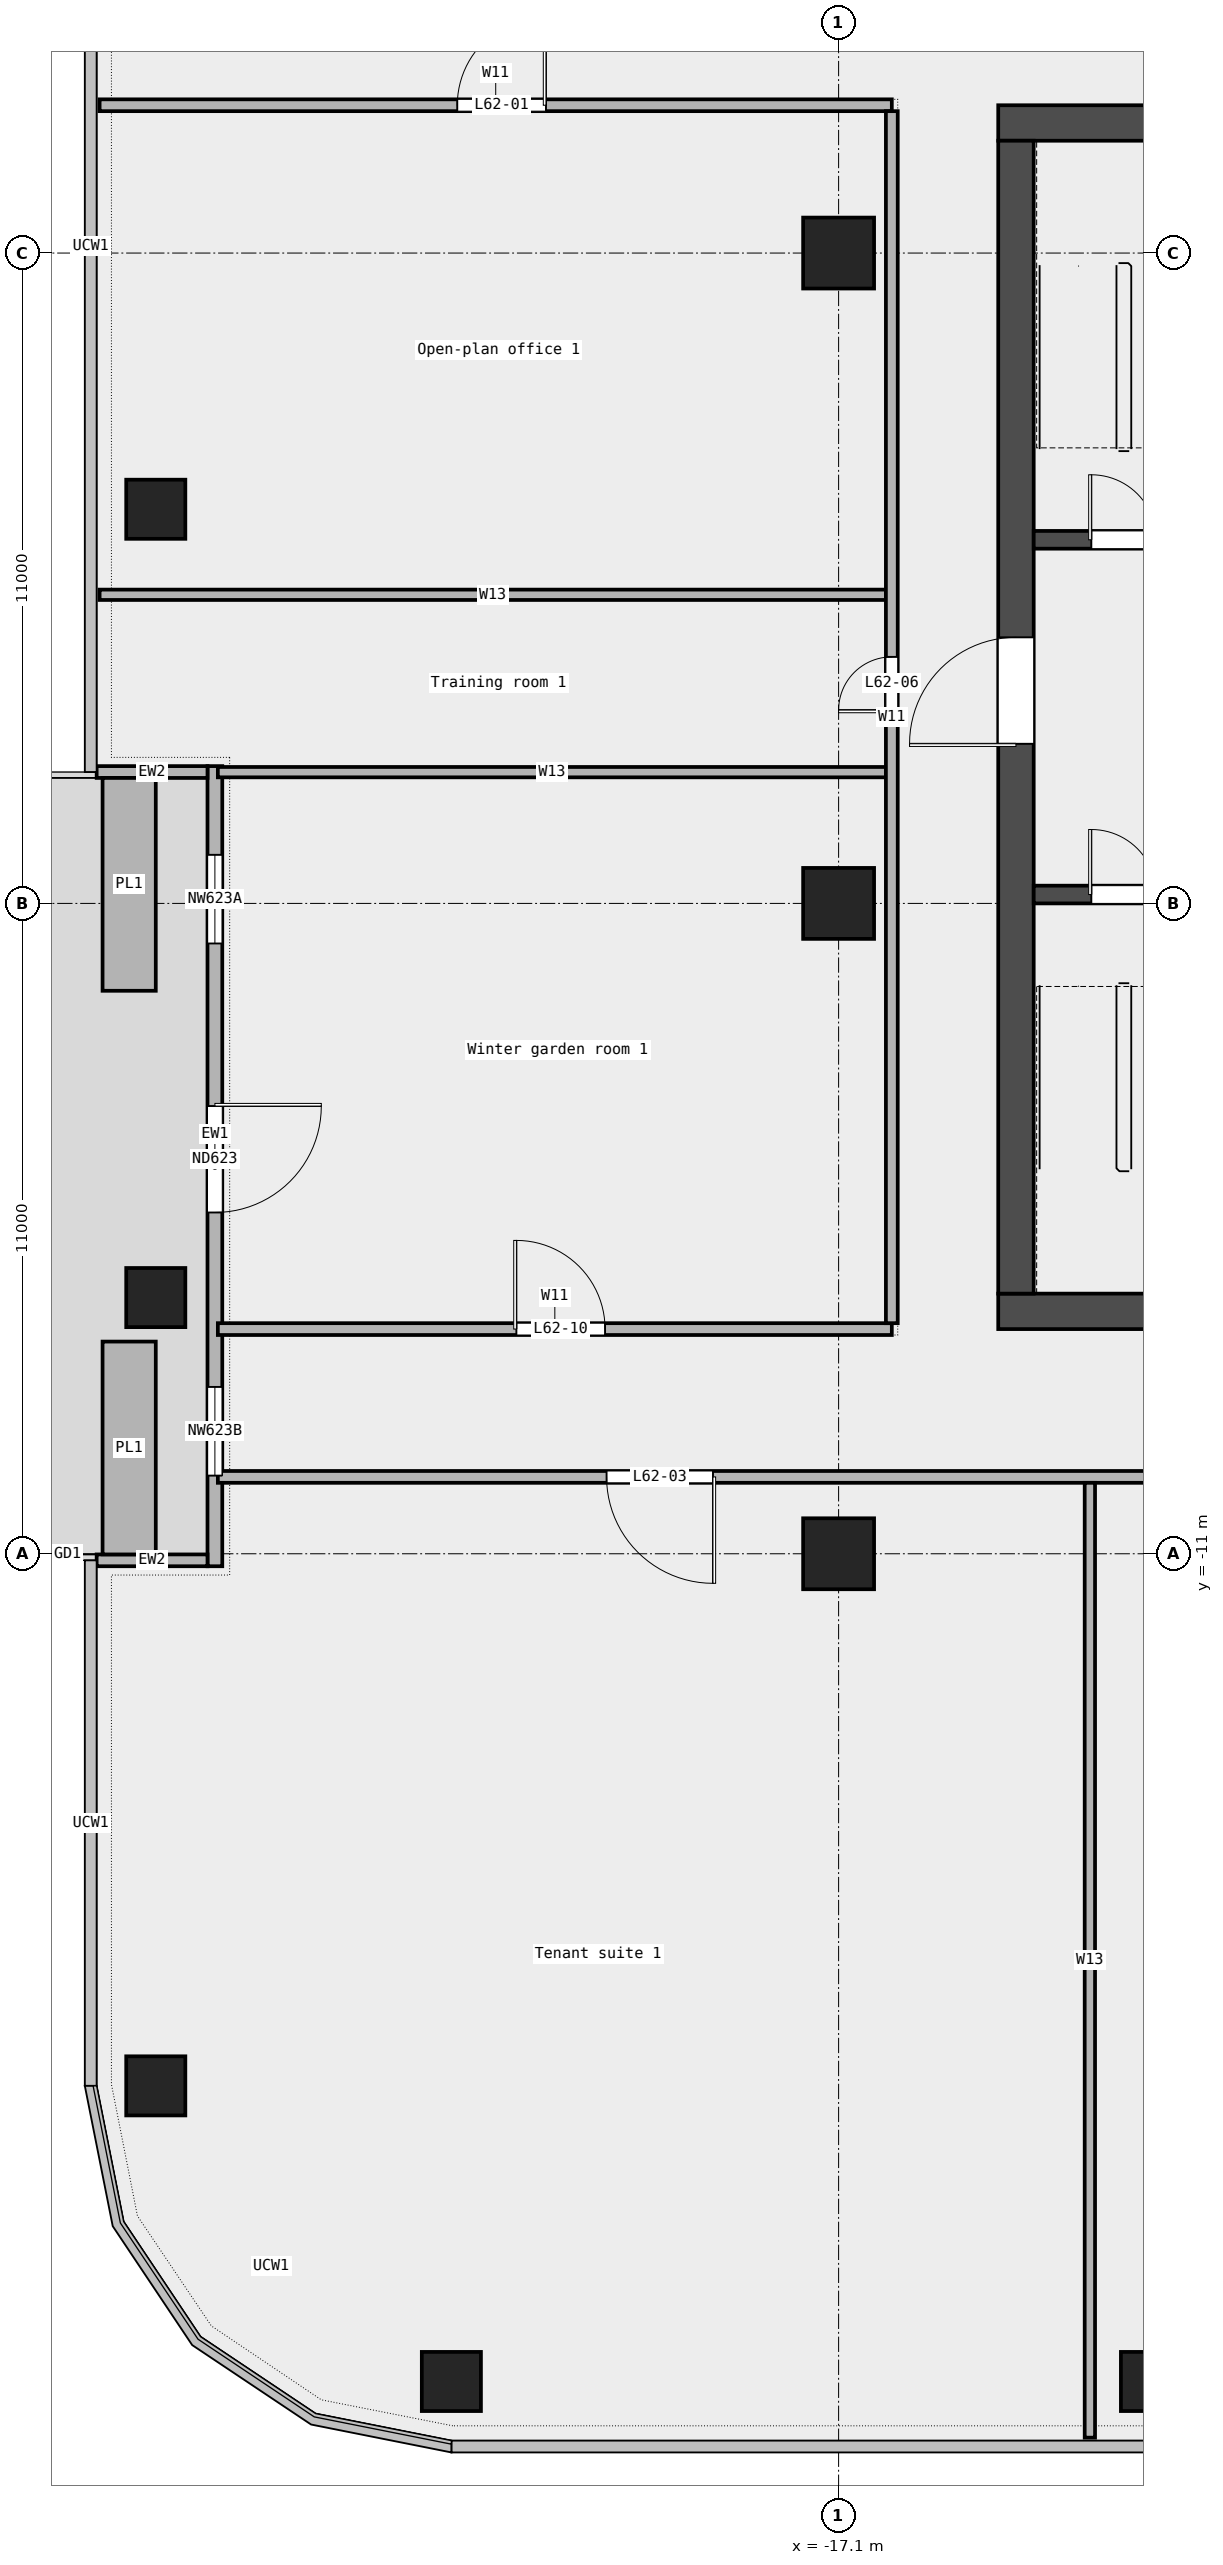
"""IFC4 building model, lengths in metres.
Left out: names, types, materials, properties, quantities, classifications, styles, units other than length and angle.
Written with IfcOpenShell. Run it as: python <this file> out.ifc"""

import sys

from ifc_helpers import new_model, si_unit, direction, frame, frame_2d, origin, origin_2d, place, context, subcontext, project, spatial, rectangle, extrude, element, fill, save


model = new_model("IFC4")
c1 = context("Model", 3, precision=1e-05, world=origin(), true_north=direction((0.0, 1.0)))
c2 = subcontext(c1, "Body", "Model", "MODEL_VIEW")
j1 = project(units=[si_unit("LENGTHUNIT", "METRE"), si_unit("PLANEANGLEUNIT", "RADIAN")], contexts=[c1])
p1 = place(None, origin())
s1 = spatial("IfcSite", under=j1, at=p1, CompositionType="ELEMENT")
p2 = place(p1, origin())
s2 = spatial("IfcBuilding", under=s1, at=p2, CompositionType="ELEMENT")
p3 = place(p2, frame((0.0, 0.0, 287.4)))
s3 = spatial("IfcBuildingStorey", under=s2, at=p3, CompositionType="ELEMENT", Elevation=287.4)
for number, where, z_axis, x_axis in (
    (1, (-23.65, -25.0, 0.0), (0.0, 0.0, 1.0), (1.0, 0.0, 0.0)),
    (2, (-11.825, -25.0, 0.0), (0.0, 0.0, 1.0), (1.0, 0.0, 0.0)),
    (3, (-28.65, 6.667, 0.0), (0.0, 0.0, 1.0), (1.0, 0.0, 0.0)),
    (4, (-28.65, -6.667, 0.0), (0.0, 0.0, 1.0), (1.0, 0.0, 0.0)),
    (5, (-28.65, -20.0, 0.0), (0.0, 0.0, 1.0), (1.0, 0.0, 0.0)),
):
    element("IfcColumn", number, at=place(p3, frame(where, z_axis=z_axis, x_axis=x_axis)), inside=s3, PredefinedType="COLUMN", context=c2, shape_type="SweptSolid", body=[
        extrude(rectangle(XDim=1.0, YDim=1.0, at=origin_2d()), origin(), (0.0, 0.0, 1.0), 3.6),
    ])
for number, where, z_axis, x_axis in (
    (6, (-17.1, -11.0, 0.0), (0.0, 0.0, 1.0), (1.0, 0.0, 0.0)),
    (7, (-17.1, 0.0, 0.0), (0.0, 0.0, 1.0), (1.0, 0.0, 0.0)),
    (8, (-17.1, 11.0, 0.0), (0.0, 0.0, 1.0), (1.0, 0.0, 0.0)),
):
    element("IfcColumn", number, at=place(p3, frame(where, z_axis=z_axis, x_axis=x_axis)), inside=s3, PredefinedType="COLUMN", context=c2, shape_type="SweptSolid", body=[
        extrude(rectangle(XDim=1.2, YDim=1.2, at=origin_2d()), origin(), (0.0, 0.0, 1.0), 3.6),
    ])
p4 = place(p3, frame((-27.65, 2.322, 0.0), z_axis=(0.0, 0.0, 1.0), x_axis=(0.0, -1.0, 0.0)))
e9 = element("IfcWall", 9, at=p4, inside=s3, PredefinedType="STANDARD", context=c2, shape_type="SweptSolid", body=[
    extrude(rectangle(XDim=13.533, YDim=0.25, at=frame_2d((6.767, 0.0))), origin(), (0.0, 0.0, 1.0), 3.6),
])
p5 = place(p4, frame((1.5, 0.0, 0.45)))
e10 = element("IfcOpeningElement", 10, at=p5, cuts=e9, PredefinedType="OPENING", context=c2, shape_type="SweptSolid", body=[
    extrude(rectangle(XDim=1.5, YDim=2.4, at=frame_2d((0.75, 1.2))), frame((0.0, 0.137, 0.0), z_axis=(0.0, -1.0, 0.0), x_axis=(1.0, 0.0, 0.0)), (0.0, 0.0, 1.0), 0.274),
])
p6 = place(p4, frame((5.75, 0.0, 0.0)))
e11 = element("IfcOpeningElement", 11, at=p6, cuts=e9, PredefinedType="OPENING", context=c2, shape_type="SweptSolid", body=[
    extrude(rectangle(XDim=1.8, YDim=2.4, at=frame_2d((0.9, 1.2))), frame((0.0, 0.137, 0.0), z_axis=(0.0, -1.0, 0.0), x_axis=(1.0, 0.0, 0.0)), (0.0, 0.0, 1.0), 0.274),
])
p7 = place(p4, frame((10.5, 0.0, 0.45)))
e12 = element("IfcOpeningElement", 12, at=p7, cuts=e9, PredefinedType="OPENING", context=c2, shape_type="SweptSolid", body=[
    extrude(rectangle(XDim=1.5, YDim=2.4, at=frame_2d((0.75, 1.2))), frame((0.0, 0.137, 0.0), z_axis=(0.0, -1.0, 0.0), x_axis=(1.0, 0.0, 0.0)), (0.0, 0.0, 1.0), 0.274),
])
for number, where, z_axis, x_axis in (
    (13, (-29.65, 2.222, 0.0), (0.0, 0.0, 1.0), (1.0, 0.0, 0.0)),
    (14, (-29.65, -11.111, 0.0), (0.0, 0.0, 1.0), (1.0, 0.0, 0.0)),
):
    element("IfcWall", number, at=place(p3, frame(where, z_axis=z_axis, x_axis=x_axis)), inside=s3, PredefinedType="STANDARD", context=c2, shape_type="SweptSolid", body=[
        extrude(rectangle(XDim=1.875, YDim=0.2, at=frame_2d((0.938, 0.0))), origin(), (0.0, 0.0, 1.0), 3.6),
    ])
for number, where, z_axis, x_axis in (
    (15, (-29.1, 2.122, 0.0), (0.0, 0.0, 1.0), (0.0, -1.0, 0.0)),
    (16, (-29.1, -7.411, 0.0), (0.0, 0.0, 1.0), (0.0, -1.0, 0.0)),
):
    element("IfcWall", number, at=place(p3, frame(where, z_axis=z_axis, x_axis=x_axis)), inside=s3, PredefinedType="STANDARD", context=c2, shape_type="SweptSolid", body=[
        extrude(rectangle(XDim=3.6, YDim=0.9, at=frame_2d((1.8, 0.0))), origin(), (0.0, 0.0, 1.0), 0.7),
    ])
p8 = place(p3, frame((-27.6, -9.7, 0.0), z_axis=(0.0, 0.0, 1.0), x_axis=(1.0, 0.0, 0.0)))
e17 = element("IfcWall", 17, at=p8, inside=s3, PredefinedType="PARTITIONING", context=c2, shape_type="SweptSolid", body=[
    extrude(rectangle(XDim=55.2, YDim=0.2, at=frame_2d((27.6, 0.0))), origin(), (0.0, 0.0, 1.0), 3.6),
])
p9 = place(p8, frame((6.575, 0.0, 0.0)))
e18 = element("IfcOpeningElement", 18, at=p9, cuts=e17, PredefinedType="OPENING", context=c2, shape_type="SweptSolid", body=[
    extrude(rectangle(XDim=1.8, YDim=2.1, at=frame_2d((0.9, 1.05))), frame((0.0, 0.112, 0.0), z_axis=(0.0, -1.0, 0.0), x_axis=(1.0, 0.0, 0.0)), (0.0, 0.0, 1.0), 0.224),
])
p10 = place(p8, frame((33.975, 0.0, 0.0)))
e19 = element("IfcOpeningElement", 19, at=p10, cuts=e17, PredefinedType="OPENING", context=c2, shape_type="SweptSolid", body=[
    extrude(rectangle(XDim=1.8, YDim=2.1, at=frame_2d((0.9, 1.05))), frame((0.0, 0.112, 0.0), z_axis=(0.0, -1.0, 0.0), x_axis=(1.0, 0.0, 0.0)), (0.0, 0.0, 1.0), 0.224),
])
p11 = place(p3, frame((-27.6, -7.2, 0.0), z_axis=(0.0, 0.0, 1.0), x_axis=(1.0, 0.0, 0.0)))
e20 = element("IfcWall", 20, at=p11, inside=s3, PredefinedType="PARTITIONING", context=c2, shape_type="SweptSolid", body=[
    extrude(rectangle(XDim=11.4, YDim=0.2, at=frame_2d((5.7, 0.0))), origin(), (0.0, 0.0, 1.0), 3.6),
])
p12 = place(p11, frame((5.05, 0.0, 0.0)))
e21 = element("IfcOpeningElement", 21, at=p12, cuts=e20, PredefinedType="OPENING", context=c2, shape_type="SweptSolid", body=[
    extrude(rectangle(XDim=1.5, YDim=2.1, at=frame_2d((0.75, 1.05))), frame((0.0, 0.112, 0.0), z_axis=(0.0, -1.0, 0.0), x_axis=(1.0, 0.0, 0.0)), (0.0, 0.0, 1.0), 0.224),
])
p13 = place(p3, frame((-27.6, 2.22, 0.0), z_axis=(0.0, 0.0, 1.0), x_axis=(1.0, 0.0, 0.0)))
e22 = element("IfcWall", 22, at=p13, inside=s3, PredefinedType="PARTITIONING", context=c2, shape_type="SweptSolid", body=[
    extrude(rectangle(XDim=11.3, YDim=0.175, at=frame_2d((5.65, 0.0))), origin(), (0.0, 0.0, 1.0), 3.6),
])
p14 = place(p3, frame((-29.6, 5.22, 0.0), z_axis=(0.0, 0.0, 1.0), x_axis=(1.0, 0.0, 0.0)))
e23 = element("IfcWall", 23, at=p14, inside=s3, PredefinedType="PARTITIONING", context=c2, shape_type="SweptSolid", body=[
    extrude(rectangle(XDim=13.3, YDim=0.175, at=frame_2d((6.65, 0.0))), origin(), (0.0, 0.0, 1.0), 3.6),
])
p15 = place(p3, frame((-29.6, 13.5, 0.0), z_axis=(0.0, 0.0, 1.0), x_axis=(1.0, 0.0, 0.0)))
e24 = element("IfcWall", 24, at=p15, inside=s3, PredefinedType="PARTITIONING", context=c2, shape_type="SweptSolid", body=[
    extrude(rectangle(XDim=13.4, YDim=0.2, at=frame_2d((6.7, 0.0))), origin(), (0.0, 0.0, 1.0), 3.6),
])
p16 = place(p15, frame((6.05, 0.0, 0.0)))
e25 = element("IfcOpeningElement", 25, at=p16, cuts=e24, PredefinedType="OPENING", context=c2, shape_type="SweptSolid", body=[
    extrude(rectangle(XDim=1.5, YDim=2.1, at=frame_2d((0.75, 1.05))), frame((0.0, 0.112, 0.0), z_axis=(0.0, -1.0, 0.0), x_axis=(1.0, 0.0, 0.0)), (0.0, 0.0, 1.0), 0.224),
])
p17 = place(p3, frame((-16.2, -7.1, 0.0), z_axis=(0.0, 0.0, 1.0), x_axis=(0.0, 1.0, 0.0)))
e26 = element("IfcWall", 26, at=p17, inside=s3, PredefinedType="PARTITIONING", context=c2, shape_type="SweptSolid", body=[
    extrude(rectangle(XDim=20.5, YDim=0.2, at=frame_2d((10.25, 0.0))), origin(), (0.0, 0.0, 1.0), 3.6),
])
p18 = place(p17, frame((10.37, 0.0, 0.0)))
e27 = element("IfcOpeningElement", 27, at=p18, cuts=e26, PredefinedType="OPENING", context=c2, shape_type="SweptSolid", body=[
    extrude(rectangle(XDim=0.9, YDim=2.1, at=frame_2d((0.45, 1.05))), frame((0.0, 0.112, 0.0), z_axis=(0.0, -1.0, 0.0), x_axis=(1.0, 0.0, 0.0)), (0.0, 0.0, 1.0), 0.224),
])
p19 = place(p3, frame((-12.85, -25.95, 0.0), z_axis=(0.0, 0.0, 1.0), x_axis=(0.0, 1.0, 0.0)))
e28 = element("IfcWall", 28, at=p19, inside=s3, PredefinedType="PARTITIONING", context=c2, shape_type="SweptSolid", body=[
    extrude(rectangle(XDim=16.15, YDim=0.175, at=frame_2d((8.075, 0.0))), origin(), (0.0, 0.0, 1.0), 3.6),
])
p20 = place(p3, frame((-14.4, -6.9, 0.0), z_axis=(0.0, 0.0, 1.0), x_axis=(1.0, 0.0, 0.0)))
e29 = element("IfcWall", 29, at=p20, inside=s3, PredefinedType="SHEAR", context=c2, shape_type="SweptSolid", body=[
    extrude(rectangle(XDim=28.8, YDim=0.6, at=frame_2d((14.4, 0.0))), origin(), (0.0, 0.0, 1.0), 3.7),
])
p21 = place(p20, frame((6.3, 0.0, 0.0)))
e30 = element("IfcOpeningElement", 30, at=p21, cuts=e29, PredefinedType="OPENING", context=c2, shape_type="SweptSolid", body=[
    extrude(rectangle(XDim=1.2, YDim=2.1, at=frame_2d((0.6, 1.05))), frame((0.0, 0.312, 0.0), z_axis=(0.0, -1.0, 0.0), x_axis=(1.0, 0.0, 0.0)), (0.0, 0.0, 1.0), 0.624),
])
p22 = place(p20, frame((11.462, 0.0, 0.0)))
e31 = element("IfcOpeningElement", 31, at=p22, cuts=e29, PredefinedType="OPENING", context=c2, shape_type="SweptSolid", body=[
    extrude(rectangle(XDim=1.0, YDim=2.1, at=frame_2d((0.5, 1.05))), frame((0.0, 0.312, 0.0), z_axis=(0.0, -1.0, 0.0), x_axis=(1.0, 0.0, 0.0)), (0.0, 0.0, 1.0), 0.624),
])
p23 = place(p20, frame((15.025, 0.0, 0.0)))
e32 = element("IfcOpeningElement", 32, at=p23, cuts=e29, PredefinedType="OPENING", context=c2, shape_type="SweptSolid", body=[
    extrude(rectangle(XDim=1.0, YDim=2.1, at=frame_2d((0.5, 1.05))), frame((0.0, 0.312, 0.0), z_axis=(0.0, -1.0, 0.0), x_axis=(1.0, 0.0, 0.0)), (0.0, 0.0, 1.0), 0.624),
])
p24 = place(p20, frame((18.75, 0.0, 0.0)))
e33 = element("IfcOpeningElement", 33, at=p24, cuts=e29, PredefinedType="OPENING", context=c2, shape_type="SweptSolid", body=[
    extrude(rectangle(XDim=1.8, YDim=2.1, at=frame_2d((0.9, 1.05))), frame((0.0, 0.312, 0.0), z_axis=(0.0, -1.0, 0.0), x_axis=(1.0, 0.0, 0.0)), (0.0, 0.0, 1.0), 0.624),
])
p25 = place(p20, frame((23.087, 0.0, 0.0)))
e34 = element("IfcOpeningElement", 34, at=p25, cuts=e29, PredefinedType="OPENING", context=c2, shape_type="SweptSolid", body=[
    extrude(rectangle(XDim=1.0, YDim=2.1, at=frame_2d((0.5, 1.05))), frame((0.0, 0.312, 0.0), z_axis=(0.0, -1.0, 0.0), x_axis=(1.0, 0.0, 0.0)), (0.0, 0.0, 1.0), 0.624),
])
p26 = place(p3, frame((-14.4, 13.2, 0.0), z_axis=(0.0, 0.0, 1.0), x_axis=(1.0, 0.0, 0.0)))
e35 = element("IfcWall", 35, at=p26, inside=s3, PredefinedType="SHEAR", context=c2, shape_type="SweptSolid", body=[
    extrude(rectangle(XDim=28.8, YDim=0.6, at=frame_2d((14.4, 0.0))), origin(), (0.0, 0.0, 1.0), 3.7),
])
p27 = place(p26, frame((6.3, 0.0, 0.0)))
e36 = element("IfcOpeningElement", 36, at=p27, cuts=e35, PredefinedType="OPENING", context=c2, shape_type="SweptSolid", body=[
    extrude(rectangle(XDim=1.2, YDim=2.1, at=frame_2d((0.6, 1.05))), frame((0.0, 0.312, 0.0), z_axis=(0.0, -1.0, 0.0), x_axis=(1.0, 0.0, 0.0)), (0.0, 0.0, 1.0), 0.624),
])
p28 = place(p26, frame((21.3, 0.0, 0.0)))
e37 = element("IfcOpeningElement", 37, at=p28, cuts=e35, PredefinedType="OPENING", context=c2, shape_type="SweptSolid", body=[
    extrude(rectangle(XDim=1.2, YDim=2.1, at=frame_2d((0.6, 1.05))), frame((0.0, 0.312, 0.0), z_axis=(0.0, -1.0, 0.0), x_axis=(1.0, 0.0, 0.0)), (0.0, 0.0, 1.0), 0.624),
])
p29 = place(p3, frame((-14.1, -6.6, 0.0), z_axis=(0.0, 0.0, 1.0), x_axis=(0.0, 1.0, 0.0)))
e38 = element("IfcWall", 38, at=p29, inside=s3, PredefinedType="SHEAR", context=c2, shape_type="SweptSolid", body=[
    extrude(rectangle(XDim=19.5, YDim=0.6, at=frame_2d((9.75, 0.0))), origin(), (0.0, 0.0, 1.0), 3.7),
])
p30 = place(p29, frame((9.3, 0.0, 0.0)))
e39 = element("IfcOpeningElement", 39, at=p30, cuts=e38, PredefinedType="OPENING", context=c2, shape_type="SweptSolid", body=[
    extrude(rectangle(XDim=1.8, YDim=2.1, at=frame_2d((0.9, 1.05))), frame((0.0, 0.312, 0.0), z_axis=(0.0, -1.0, 0.0), x_axis=(1.0, 0.0, 0.0)), (0.0, 0.0, 1.0), 0.624),
])
p31 = place(p3, frame((-13.8, 0.15, 0.0), z_axis=(0.0, 0.0, 1.0), x_axis=(1.0, 0.0, 0.0)))
e40 = element("IfcWall", 40, at=p31, inside=s3, PredefinedType="SOLIDWALL", context=c2, shape_type="SweptSolid", body=[
    extrude(rectangle(XDim=3.15, YDim=0.3, at=frame_2d((1.575, 0.0))), origin(), (0.0, 0.0, 1.0), 3.7),
])
p32 = place(p31, frame((0.975, 0.0, 0.0)))
e41 = element("IfcOpeningElement", 41, at=p32, cuts=e40, PredefinedType="OPENING", context=c2, shape_type="SweptSolid", body=[
    extrude(rectangle(XDim=1.1, YDim=2.1, at=frame_2d((0.55, 1.05))), frame((0.0, 0.162, 0.0), z_axis=(0.0, -1.0, 0.0), x_axis=(1.0, 0.0, 0.0)), (0.0, 0.0, 1.0), 0.324),
])
p33 = place(p3, frame((-13.8, 6.15, 0.0), z_axis=(0.0, 0.0, 1.0), x_axis=(1.0, 0.0, 0.0)))
e42 = element("IfcWall", 42, at=p33, inside=s3, PredefinedType="SOLIDWALL", context=c2, shape_type="SweptSolid", body=[
    extrude(rectangle(XDim=3.15, YDim=0.3, at=frame_2d((1.575, 0.0))), origin(), (0.0, 0.0, 1.0), 3.7),
])
p34 = place(p33, frame((0.975, 0.0, 0.0)))
e43 = element("IfcOpeningElement", 43, at=p34, cuts=e42, PredefinedType="OPENING", context=c2, shape_type="SweptSolid", body=[
    extrude(rectangle(XDim=1.1, YDim=2.1, at=frame_2d((0.55, 1.05))), frame((0.0, 0.162, 0.0), z_axis=(0.0, -1.0, 0.0), x_axis=(1.0, 0.0, 0.0)), (0.0, 0.0, 1.0), 0.324),
])
p35 = place(p5, origin())
e44 = element("IfcWindow", 44, at=p35, inside=s3, PartitioningType="SINGLE_PANEL", PredefinedType="WINDOW", context=c2, shape_type="SweptSolid", body=[
    extrude(rectangle(XDim=1.5, YDim=2.4, at=frame_2d((0.75, 1.2))), frame((0.0, 0.03, 0.0), z_axis=(0.0, -1.0, 0.0), x_axis=(1.0, 0.0, 0.0)), (0.0, 0.0, 1.0), 0.06),
])
fill(e10, e44)
p36 = place(p6, origin())
e45 = element("IfcDoor", 45, at=p36, inside=s3, OperationType="DOUBLE_DOOR_SINGLE_SWING", PredefinedType="DOOR", context=c2, shape_type="SweptSolid", body=[
    extrude(rectangle(XDim=1.8, YDim=2.4, at=frame_2d((0.9, 1.2))), frame((0.0, 0.025, 0.0), z_axis=(0.0, -1.0, 0.0), x_axis=(1.0, 0.0, 0.0)), (0.0, 0.0, 1.0), 0.05),
])
fill(e11, e45)
p37 = place(p7, origin())
e46 = element("IfcWindow", 46, at=p37, inside=s3, PartitioningType="SINGLE_PANEL", PredefinedType="WINDOW", context=c2, shape_type="SweptSolid", body=[
    extrude(rectangle(XDim=1.5, YDim=2.4, at=frame_2d((0.75, 1.2))), frame((0.0, 0.03, 0.0), z_axis=(0.0, -1.0, 0.0), x_axis=(1.0, 0.0, 0.0)), (0.0, 0.0, 1.0), 0.06),
])
fill(e12, e46)
p38 = place(p16, origin())
e47 = element("IfcDoor", 47, at=p38, inside=s3, OperationType="DOUBLE_DOOR_SINGLE_SWING", PredefinedType="DOOR", context=c2, shape_type="SweptSolid", body=[
    extrude(rectangle(XDim=1.5, YDim=2.1, at=frame_2d((0.75, 1.05))), frame((0.0, 0.025, 0.0), z_axis=(0.0, -1.0, 0.0), x_axis=(1.0, 0.0, 0.0)), (0.0, 0.0, 1.0), 0.05),
])
fill(e25, e47)
p39 = place(p9, origin())
e48 = element("IfcDoor", 48, at=p39, inside=s3, OperationType="DOUBLE_DOOR_SINGLE_SWING", PredefinedType="DOOR", context=c2, shape_type="SweptSolid", body=[
    extrude(rectangle(XDim=1.8, YDim=2.1, at=frame_2d((0.9, 1.05))), frame((0.0, 0.025, 0.0), z_axis=(0.0, -1.0, 0.0), x_axis=(1.0, 0.0, 0.0)), (0.0, 0.0, 1.0), 0.05),
])
fill(e18, e48)
p40 = place(p18, origin())
e49 = element("IfcDoor", 49, at=p40, inside=s3, OperationType="SINGLE_SWING_LEFT", PredefinedType="DOOR", context=c2, shape_type="SweptSolid", body=[
    extrude(rectangle(XDim=0.9, YDim=2.1, at=frame_2d((0.45, 1.05))), frame((0.0, 0.025, 0.0), z_axis=(0.0, -1.0, 0.0), x_axis=(1.0, 0.0, 0.0)), (0.0, 0.0, 1.0), 0.05),
])
fill(e27, e49)
p41 = place(p12, origin())
e50 = element("IfcDoor", 50, at=p41, inside=s3, OperationType="DOUBLE_DOOR_SINGLE_SWING", PredefinedType="DOOR", context=c2, shape_type="SweptSolid", body=[
    extrude(rectangle(XDim=1.5, YDim=2.1, at=frame_2d((0.75, 1.05))), frame((0.0, 0.025, 0.0), z_axis=(0.0, -1.0, 0.0), x_axis=(1.0, 0.0, 0.0)), (0.0, 0.0, 1.0), 0.05),
])
fill(e21, e50)
p42 = place(p32, origin())
e51 = element("IfcDoor", 51, at=p42, inside=s3, OperationType="SINGLE_SWING_LEFT", PredefinedType="DOOR", context=c2, shape_type="SweptSolid", body=[
    extrude(rectangle(XDim=1.1, YDim=2.1, at=frame_2d((0.55, 1.05))), frame((0.0, 0.025, 0.0), z_axis=(0.0, -1.0, 0.0), x_axis=(1.0, 0.0, 0.0)), (0.0, 0.0, 1.0), 0.05),
])
fill(e41, e51)
p43 = place(p34, origin())
e52 = element("IfcDoor", 52, at=p43, inside=s3, OperationType="SINGLE_SWING_LEFT", PredefinedType="DOOR", context=c2, shape_type="SweptSolid", body=[
    extrude(rectangle(XDim=1.1, YDim=2.1, at=frame_2d((0.55, 1.05))), frame((0.0, 0.025, 0.0), z_axis=(0.0, -1.0, 0.0), x_axis=(1.0, 0.0, 0.0)), (0.0, 0.0, 1.0), 0.05),
])
fill(e43, e52)
p44 = place(p30, origin())
e53 = element("IfcDoor", 53, at=p44, inside=s3, OperationType="DOUBLE_DOOR_SINGLE_SWING", PredefinedType="DOOR", context=c2, shape_type="SweptSolid", body=[
    extrude(rectangle(XDim=1.8, YDim=2.1, at=frame_2d((0.9, 1.05))), frame((0.0, 0.025, 0.0), z_axis=(0.0, -1.0, 0.0), x_axis=(1.0, 0.0, 0.0)), (0.0, 0.0, 1.0), 0.05),
])
fill(e39, e53)
save(model, sys.argv[1])
